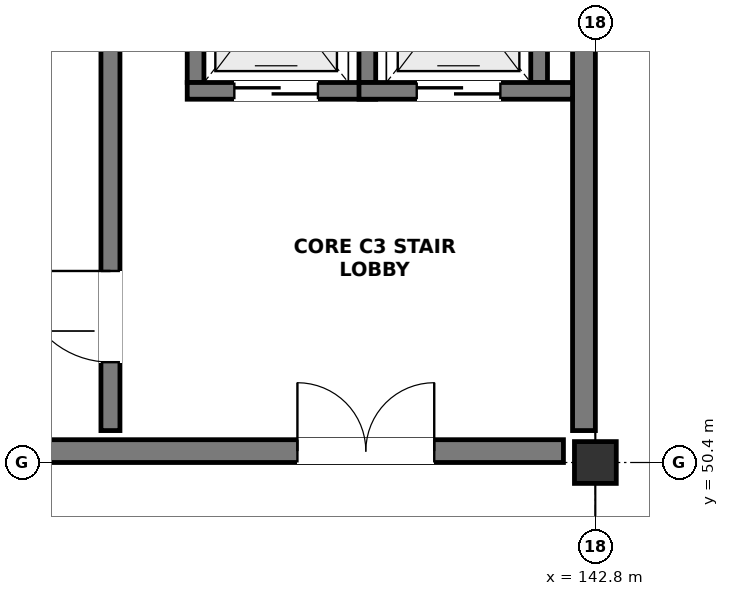
"""IFC4 building model, lengths in metres.
Left out: names, types, materials, properties, quantities, classifications, styles, units other than length and angle.
Written with IfcOpenShell. Run it as: python <this file> out.ifc"""

import sys

from ifc_helpers import new_model, si_unit, direction, frame, frame_2d, origin, origin_2d, place, context, subcontext, project, spatial, rectangle, extrude, element, fill, save


model = new_model("IFC4")
c1 = context("Model", 3, precision=1e-05, world=origin(), true_north=direction((0.0, 1.0)))
c2 = subcontext(c1, "Body", "Model", "MODEL_VIEW")
j1 = project(units=[si_unit("LENGTHUNIT", "METRE"), si_unit("PLANEANGLEUNIT", "RADIAN")], contexts=[c1])
p1 = place(None, origin())
s1 = spatial("IfcSite", under=j1, at=p1, CompositionType="ELEMENT")
p2 = place(p1, origin())
s2 = spatial("IfcBuilding", under=s1, at=p2, CompositionType="ELEMENT")
p3 = place(p2, frame((0.0, 0.0, 18.3)))
s3 = spatial("IfcBuildingStorey", under=s2, at=p3, CompositionType="ELEMENT", Elevation=18.3)
p4 = place(p3, frame((142.8, 50.4, 0.0), z_axis=(0.0, 0.0, 1.0), x_axis=(1.0, 0.0, 0.0)))
e1 = element("IfcColumn", 1, at=p4, inside=s3, PredefinedType="COLUMN", context=c2, shape_type="SweptSolid", body=[
    extrude(rectangle(XDim=0.55, YDim=0.55, at=origin_2d()), origin(), (0.0, 0.0, 1.0), 3.3),
])
p5 = place(p3, frame((126.45, 50.55, 0.0), z_axis=(0.0, 0.0, 1.0), x_axis=(1.0, 0.0, 0.0)))
e2 = element("IfcWall", 2, at=p5, inside=s3, PredefinedType="SHEAR", context=c2, shape_type="SweptSolid", body=[
    extrude(rectangle(XDim=15.93, YDim=0.3, at=frame_2d((7.965, 0.0))), origin(), (0.0, 0.0, 1.0), 3.04),
])
p6 = place(p5, frame((12.43, 0.0, 0.0)))
e3 = element("IfcOpeningElement", 3, at=p6, cuts=e2, PredefinedType="OPENING", context=c2, shape_type="SweptSolid", body=[
    extrude(rectangle(XDim=1.8, YDim=2.2, at=frame_2d((0.9, 1.1))), frame((0.0, 0.162, 0.0), z_axis=(0.0, -1.0, 0.0), x_axis=(1.0, 0.0, 0.0)), (0.0, 0.0, 1.0), 0.324),
])
p7 = place(p3, frame((142.65, 50.82, 0.0), z_axis=(0.0, 0.0, 1.0), x_axis=(0.0, 1.0, 0.0)))
e4 = element("IfcWall", 4, at=p7, inside=s3, PredefinedType="SHEAR", context=c2, shape_type="SweptSolid", body=[
    extrude(rectangle(XDim=7.56, YDim=0.3, at=frame_2d((3.78, 0.0))), origin(), (0.0, 0.0, 1.0), 3.04),
])
p8 = place(p3, frame((136.42, 50.82, 0.0), z_axis=(0.0, 0.0, 1.0), x_axis=(0.0, 1.0, 0.0)))
e5 = element("IfcWall", 5, at=p8, inside=s3, PredefinedType="SHEAR", context=c2, shape_type="SweptSolid", body=[
    extrude(rectangle(XDim=7.56, YDim=0.25, at=frame_2d((3.78, 0.0))), origin(), (0.0, 0.0, 1.0), 3.04),
])
p9 = place(p8, frame((0.9, 0.0, 0.0)))
e6 = element("IfcOpeningElement", 6, at=p9, cuts=e5, PredefinedType="OPENING", context=c2, shape_type="SweptSolid", body=[
    extrude(rectangle(XDim=1.2, YDim=2.2, at=frame_2d((0.6, 1.1))), frame((0.0, 0.137, 0.0), z_axis=(0.0, -1.0, 0.0), x_axis=(1.0, 0.0, 0.0)), (0.0, 0.0, 1.0), 0.274),
])
p10 = place(p3, frame((137.54, 55.4, 0.0), z_axis=(0.0, 0.0, 1.0), x_axis=(0.0, 1.0, 0.0)))
e7 = element("IfcWall", 7, at=p10, inside=s3, PredefinedType="SOLIDWALL", context=c2, shape_type="SweptSolid", body=[
    extrude(rectangle(XDim=2.4, YDim=0.22, at=frame_2d((1.2, 0.0))), origin(), (0.0, 0.0, 1.0), 3.04),
])
p11 = place(p3, frame((137.43, 55.29, 0.0), z_axis=(0.0, 0.0, 1.0), x_axis=(1.0, 0.0, 0.0)))
e8 = element("IfcWall", 8, at=p11, inside=s3, PredefinedType="SOLIDWALL", context=c2, shape_type="SweptSolid", body=[
    extrude(rectangle(XDim=2.48, YDim=0.22, at=frame_2d((1.24, 0.0))), origin(), (0.0, 0.0, 1.0), 3.04),
])
p12 = place(p11, frame((0.62, 0.0, 0.0)))
e9 = element("IfcOpeningElement", 9, at=p12, cuts=e8, PredefinedType="OPENING", context=c2, shape_type="SweptSolid", body=[
    extrude(rectangle(XDim=1.1, YDim=2.15, at=frame_2d((0.55, 1.075))), frame((0.0, 0.122, 0.0), z_axis=(0.0, -1.0, 0.0), x_axis=(1.0, 0.0, 0.0)), (0.0, 0.0, 1.0), 0.244),
])
for number, where, z_axis, x_axis in (
    (10, (139.8, 55.4, 0.0), (0.0, 0.0, 1.0), (0.0, 1.0, 0.0)),
    (11, (142.06, 55.4, 0.0), (0.0, 0.0, 1.0), (0.0, 1.0, 0.0)),
):
    element("IfcWall", number, at=place(p3, frame(where, z_axis=z_axis, x_axis=x_axis)), inside=s3, PredefinedType="SOLIDWALL", context=c2, shape_type="SweptSolid", body=[
        extrude(rectangle(XDim=2.4, YDim=0.22, at=frame_2d((1.2, 0.0))), origin(), (0.0, 0.0, 1.0), 3.04),
    ])
p13 = place(p3, frame((139.69, 55.29, 0.0), z_axis=(0.0, 0.0, 1.0), x_axis=(1.0, 0.0, 0.0)))
e12 = element("IfcWall", 12, at=p13, inside=s3, PredefinedType="SOLIDWALL", context=c2, shape_type="SweptSolid", body=[
    extrude(rectangle(XDim=2.81, YDim=0.22, at=frame_2d((1.405, 0.0))), origin(), (0.0, 0.0, 1.0), 3.04),
])
p14 = place(p13, frame((0.76, 0.0, 0.0)))
e13 = element("IfcOpeningElement", 13, at=p14, cuts=e12, PredefinedType="OPENING", context=c2, shape_type="SweptSolid", body=[
    extrude(rectangle(XDim=1.1, YDim=2.15, at=frame_2d((0.55, 1.075))), frame((0.0, 0.122, 0.0), z_axis=(0.0, -1.0, 0.0), x_axis=(1.0, 0.0, 0.0)), (0.0, 0.0, 1.0), 0.244),
])
p15 = place(p6, origin())
e14 = element("IfcDoor", 14, at=p15, inside=s3, OperationType="DOUBLE_DOOR_SINGLE_SWING", PredefinedType="DOOR", context=c2, shape_type="SweptSolid", body=[
    extrude(rectangle(XDim=1.8, YDim=2.2, at=frame_2d((0.9, 1.1))), frame((0.0, 0.025, 0.0), z_axis=(0.0, -1.0, 0.0), x_axis=(1.0, 0.0, 0.0)), (0.0, 0.0, 1.0), 0.05),
])
fill(e3, e14)
p16 = place(p9, origin())
e15 = element("IfcDoor", 15, at=p16, inside=s3, OperationType="SINGLE_SWING_RIGHT", PredefinedType="DOOR", context=c2, shape_type="SweptSolid", body=[
    extrude(rectangle(XDim=1.2, YDim=2.2, at=frame_2d((0.6, 1.1))), frame((0.0, 0.025, 0.0), z_axis=(0.0, -1.0, 0.0), x_axis=(1.0, 0.0, 0.0)), (0.0, 0.0, 1.0), 0.05),
])
fill(e6, e15)
p17 = place(p12, origin())
e16 = element("IfcDoor", 16, at=p17, inside=s3, OperationType="DOUBLE_DOOR_SLIDING", PredefinedType="DOOR", context=c2, shape_type="SweptSolid", body=[
    extrude(rectangle(XDim=1.1, YDim=2.15, at=frame_2d((0.55, 1.075))), frame((0.0, 0.025, 0.0), z_axis=(0.0, -1.0, 0.0), x_axis=(1.0, 0.0, 0.0)), (0.0, 0.0, 1.0), 0.05),
])
fill(e9, e16)
p18 = place(p14, origin())
e17 = element("IfcDoor", 17, at=p18, inside=s3, OperationType="DOUBLE_DOOR_SLIDING", PredefinedType="DOOR", context=c2, shape_type="SweptSolid", body=[
    extrude(rectangle(XDim=1.1, YDim=2.15, at=frame_2d((0.55, 1.075))), frame((0.0, 0.025, 0.0), z_axis=(0.0, -1.0, 0.0), x_axis=(1.0, 0.0, 0.0)), (0.0, 0.0, 1.0), 0.05),
])
fill(e13, e17)
save(model, sys.argv[1])
